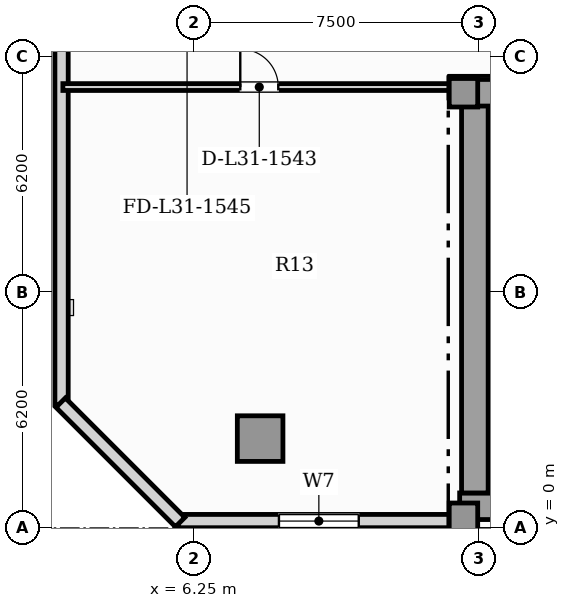
"""IFC4 building model, lengths in metres.
Left out: names, types, materials, properties, quantities, classifications, styles, units other than length and angle.
Written with IfcOpenShell. Run it as: python <this file> out.ifc"""

import sys

from ifc_helpers import new_model, si_unit, direction, frame, frame_2d, origin, origin_2d, place, context, subcontext, project, spatial, rectangle, hollow_rectangle, extrude, element, fill, save


model = new_model("IFC4")
c1 = context("Model", 3, precision=1e-05, world=origin(), true_north=direction((0.0, 1.0)))
c2 = subcontext(c1, "Body", "Model", "MODEL_VIEW")
j1 = project(units=[si_unit("LENGTHUNIT", "METRE"), si_unit("PLANEANGLEUNIT", "RADIAN")], contexts=[c1])
p1 = place(None, origin())
s1 = spatial("IfcSite", under=j1, at=p1, CompositionType="ELEMENT")
p2 = place(p1, origin())
s2 = spatial("IfcBuilding", under=s1, at=p2, CompositionType="ELEMENT")
p3 = place(p2, frame((0.0, 0.0, 127.25)))
s3 = spatial("IfcBuildingStorey", under=s2, at=p3, CompositionType="ELEMENT", Elevation=127.25)
p4 = place(p3, frame((13.25, 0.57, 0.0), z_axis=(0.0, 0.0, 1.0), x_axis=(1.0, 0.0, 0.0)))
e1 = element("IfcWall", 1, at=p4, inside=s3, PredefinedType="SHEAR", context=c2, shape_type="SweptSolid", body=[
    extrude(rectangle(XDim=31.0, YDim=0.7, at=frame_2d((15.5, 0.0))), origin(), (0.0, 0.0, 1.0), 3.6),
])
p5 = place(p3, frame((13.65, 0.92, 0.0), z_axis=(0.0, 0.0, 1.0), x_axis=(0.0, 1.0, 0.0)))
e2 = element("IfcWall", 2, at=p5, inside=s3, PredefinedType="SHEAR", context=c2, shape_type="SweptSolid", body=[
    extrude(rectangle(XDim=10.53, YDim=0.7, at=frame_2d((5.265, 0.0))), origin(), (0.0, 0.0, 1.0), 3.6),
])
p6 = place(p3, frame((13.25, 11.45, 0.0), z_axis=(0.0, 0.0, 1.0), x_axis=(1.0, 0.0, 0.0)))
e3 = element("IfcWall", 3, at=p6, inside=s3, PredefinedType="SHEAR", context=c2, shape_type="SweptSolid", body=[
    extrude(rectangle(XDim=2.95, YDim=0.7, at=frame_2d((1.475, 0.0))), origin(), (0.0, 0.0, 1.0), 3.6),
])
for number, where, z_axis, x_axis in (
    (4, (13.35, 0.28, 0.0), (0.0, 0.0, 1.0), (1.0, 0.0, 0.0)),
    (5, (13.35, 11.45, 0.0), (0.0, 0.0, 1.0), (1.0, 0.0, 0.0)),
):
    element("IfcColumn", number, at=place(p3, frame(where, z_axis=z_axis, x_axis=x_axis)), inside=s3, PredefinedType="COLUMN", context=c2, shape_type="SweptSolid", body=[
        extrude(rectangle(XDim=0.75, YDim=0.75, at=origin_2d()), origin(), (0.0, 0.0, 1.0), 3.85),
    ])
p7 = place(p3, frame((8.0, 2.35, 0.0), z_axis=(0.0, 0.0, 1.0), x_axis=(1.0, 0.0, 0.0)))
e6 = element("IfcColumn", 6, at=p7, inside=s3, PredefinedType="USERDEFINED", context=c2, shape_type="SweptSolid", body=[
    extrude(hollow_rectangle(XDim=1.2, YDim=1.2, WallThickness=0.07, at=origin_2d()), origin(), (0.0, 0.0, 1.0), 3.85),
])
p8 = place(p3, frame((5.84, 0.18, 0.0), z_axis=(0.0, 0.0, 1.0), x_axis=(1.0, 0.0, 0.0)))
e7 = element("IfcWall", 7, at=p8, inside=s3, PredefinedType="SOLIDWALL", context=c2, shape_type="SweptSolid", body=[
    extrude(rectangle(XDim=7.41, YDim=0.35, at=frame_2d((3.705, 0.0))), origin(), (0.0, 0.0, 1.0), 3.6),
])
p9 = place(p8, frame((2.655, 0.0, 0.85)))
e8 = element("IfcOpeningElement", 8, at=p9, cuts=e7, PredefinedType="OPENING", context=c2, shape_type="SweptSolid", body=[
    extrude(rectangle(XDim=2.1, YDim=2.05, at=frame_2d((1.05, 1.025))), frame((0.0, 0.185, 0.0), z_axis=(0.0, -1.0, 0.0), x_axis=(1.0, 0.0, 0.0)), (0.0, 0.0, 1.0), 0.37),
])
p10 = place(p3, frame((2.775, 39.96, 0.0), z_axis=(0.0, 0.0, 1.0), x_axis=(0.0, -1.0, 0.0)))
e9 = element("IfcWall", 9, at=p10, inside=s3, PredefinedType="SOLIDWALL", context=c2, shape_type="SweptSolid", body=[
    extrude(rectangle(XDim=36.72, YDim=0.35, at=frame_2d((18.36, 0.0))), origin(), (0.0, 0.0, 1.0), 3.6),
])
p11 = place(p10, frame((5.26, 0.0, 0.95)))
e10 = element("IfcOpeningElement", 10, at=p11, cuts=e9, PredefinedType="OPENING", context=c2, shape_type="SweptSolid", body=[
    extrude(rectangle(XDim=0.9, YDim=1.5, at=frame_2d((0.45, 0.75))), frame((0.0, 0.185, 0.0), z_axis=(0.0, -1.0, 0.0), x_axis=(1.0, 0.0, 0.0)), (0.0, 0.0, 1.0), 0.37),
])
p12 = place(p10, frame((13.466, 0.0, 0.9)))
e11 = element("IfcOpeningElement", 11, at=p12, cuts=e9, PredefinedType="OPENING", context=c2, shape_type="SweptSolid", body=[
    extrude(rectangle(XDim=1.5, YDim=1.95, at=frame_2d((0.75, 0.975))), frame((0.0, 0.185, 0.0), z_axis=(0.0, -1.0, 0.0), x_axis=(1.0, 0.0, 0.0)), (0.0, 0.0, 1.0), 0.37),
])
p13 = place(p3, frame((2.752, 3.295, 0.0), z_axis=(0.0, 0.0, 1.0), x_axis=(0.707134240044, -0.707079321262, 0.0)))
e12 = element("IfcWall", 12, at=p13, inside=s3, PredefinedType="SOLIDWALL", context=c2, shape_type="SweptSolid", body=[
    extrude(rectangle(XDim=4.446, YDim=0.35, at=frame_2d((2.223, 0.0))), origin(), (0.0, 0.0, 1.0), 3.6),
])
p14 = place(p3, frame((14.04, 8.52, 0.0), z_axis=(0.0, 0.0, 1.0), x_axis=(1.0, 0.0, 0.0)))
e13 = element("IfcWall", 13, at=p14, inside=s3, PredefinedType="SOLIDWALL", context=c2, shape_type="SweptSolid", body=[
    extrude(rectangle(XDim=3.4, YDim=0.22, at=frame_2d((1.7, 0.0))), origin(), (0.0, 0.0, 1.0), 3.6),
])
p15 = place(p14, frame((1.125, 0.0, 0.0)))
e14 = element("IfcOpeningElement", 14, at=p15, cuts=e13, PredefinedType="OPENING", context=c2, shape_type="SweptSolid", body=[
    extrude(rectangle(XDim=1.15, YDim=2.2, at=frame_2d((0.575, 1.1))), frame((0.0, 0.12, 0.0), z_axis=(0.0, -1.0, 0.0), x_axis=(1.0, 0.0, 0.0)), (0.0, 0.0, 1.0), 0.24),
])
p16 = place(p3, frame((2.81, 11.6, 0.0), z_axis=(0.0, 0.0, 1.0), x_axis=(1.0, 0.0, 0.0)))
e15 = element("IfcWall", 15, at=p16, inside=s3, PredefinedType="PARTITIONING", context=c2, shape_type="SweptSolid", body=[
    extrude(rectangle(XDim=10.335, YDim=0.18, at=frame_2d((5.167, 0.0))), origin(), (0.0, 0.0, 1.0), 3.6),
])
p17 = place(p16, frame((4.667, 0.0, 0.0)))
e16 = element("IfcOpeningElement", 16, at=p17, cuts=e15, PredefinedType="OPENING", context=c2, shape_type="SweptSolid", body=[
    extrude(rectangle(XDim=1.0, YDim=2.15, at=frame_2d((0.5, 1.075))), frame((0.0, 0.1, 0.0), z_axis=(0.0, -1.0, 0.0), x_axis=(1.0, 0.0, 0.0)), (0.0, 0.0, 1.0), 0.2),
])
p18 = place(p9, origin())
e17 = element("IfcWindow", 17, at=p18, inside=s3, PartitioningType="SINGLE_PANEL", PredefinedType="WINDOW", context=c2, shape_type="SweptSolid", body=[
    extrude(rectangle(XDim=2.1, YDim=2.05, at=frame_2d((1.05, 1.025))), frame((0.0, 0.03, 0.0), z_axis=(0.0, -1.0, 0.0), x_axis=(1.0, 0.0, 0.0)), (0.0, 0.0, 1.0), 0.06),
])
fill(e8, e17)
p19 = place(p17, origin())
e18 = element("IfcDoor", 18, at=p19, inside=s3, OperationType="SINGLE_SWING_LEFT", PredefinedType="DOOR", context=c2, shape_type="SweptSolid", body=[
    extrude(rectangle(XDim=1.0, YDim=2.15, at=frame_2d((0.5, 1.075))), frame((0.0, 0.025, 0.0), z_axis=(0.0, -1.0, 0.0), x_axis=(1.0, 0.0, 0.0)), (0.0, 0.0, 1.0), 0.05),
])
fill(e16, e18)
save(model, sys.argv[1])
